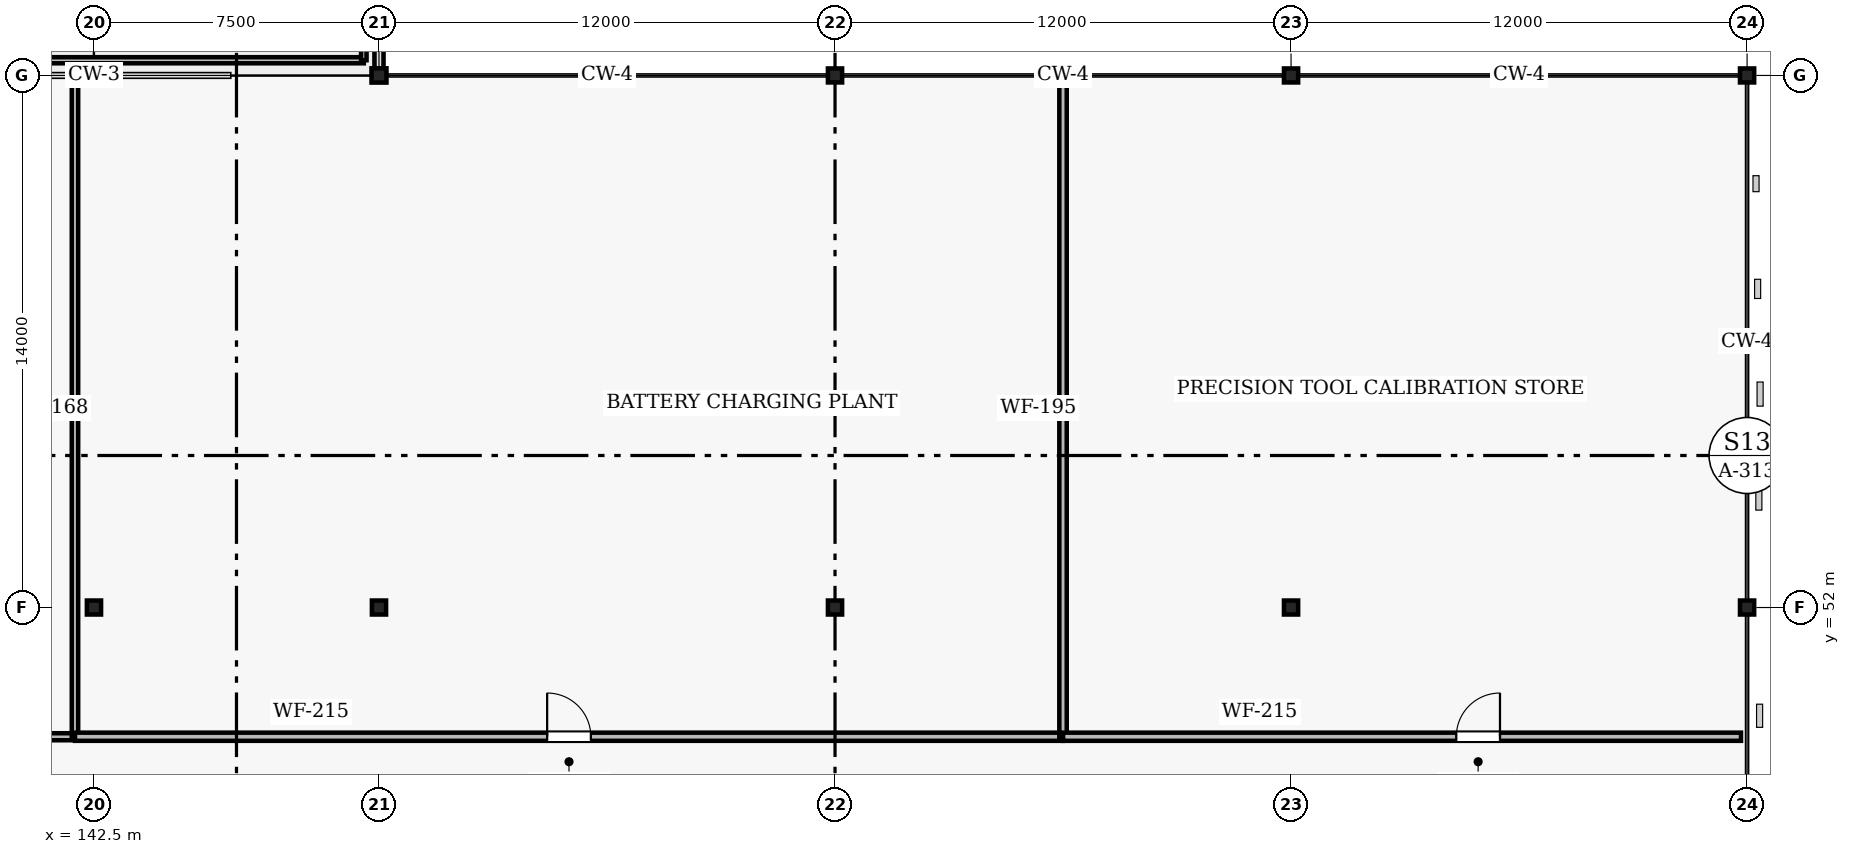
"""IFC4 building model, lengths in metres.
Left out: names, types, materials, properties, quantities, classifications, styles, units other than length and angle.
Written with IfcOpenShell. Run it as: python <this file> out.ifc"""

import sys

from ifc_helpers import new_model, si_unit, direction, frame, frame_2d, origin, origin_2d, place, context, subcontext, project, spatial, rectangle, i_section, extrude, element, fill, save


model = new_model("IFC4")
c1 = context("Model", 3, precision=1e-05, world=origin(), true_north=direction((0.0, 1.0)))
c2 = subcontext(c1, "Body", "Model", "MODEL_VIEW")
j1 = project(units=[si_unit("LENGTHUNIT", "METRE"), si_unit("PLANEANGLEUNIT", "RADIAN")], contexts=[c1])
p1 = place(None, origin())
s1 = spatial("IfcSite", under=j1, at=p1, CompositionType="ELEMENT")
p2 = place(p1, origin())
s2 = spatial("IfcBuilding", under=s1, at=p2, CompositionType="ELEMENT")
p3 = place(p2, frame((0.0, 0.0, 4.5)))
s3 = spatial("IfcBuildingStorey", under=s2, at=p3, CompositionType="ELEMENT", Elevation=4.5)
p4 = place(p3, frame((142.5, 52.0, 0.0), z_axis=(0.0, 0.0, 1.0), x_axis=(1.0, 0.0, 0.0)))
e1 = element("IfcColumn", 1, at=p4, inside=s3, PredefinedType="COLUMN", context=c2, shape_type="SweptSolid", body=[
    extrude(i_section(OverallWidth=0.373, OverallDepth=0.368, WebThickness=0.015, FlangeThickness=0.024, FilletRadius=0.015, at=origin_2d()), origin(), (0.0, 0.0, 1.0), 4.5),
])
p5 = place(p3, frame((142.5, 66.0, 0.0), z_axis=(0.0, 0.0, 1.0), x_axis=(1.0, 0.0, 0.0)))
e2 = element("IfcColumn", 2, at=p5, inside=s3, PredefinedType="COLUMN", context=c2, shape_type="SweptSolid", body=[
    extrude(i_section(OverallWidth=0.394, OverallDepth=0.375, WebThickness=0.021, FlangeThickness=0.033, FilletRadius=0.018, at=origin_2d()), origin(), (0.0, 0.0, 1.0), 4.5),
])
p6 = place(p3, frame((150.0, 52.0, 0.0), z_axis=(0.0, 0.0, 1.0), x_axis=(1.0, 0.0, 0.0)))
e3 = element("IfcColumn", 3, at=p6, inside=s3, PredefinedType="COLUMN", context=c2, shape_type="SweptSolid", body=[
    extrude(i_section(OverallWidth=0.373, OverallDepth=0.368, WebThickness=0.015, FlangeThickness=0.024, FilletRadius=0.015, at=origin_2d()), origin(), (0.0, 0.0, 1.0), 4.5),
])
p7 = place(p3, frame((150.0, 66.0, 0.0), z_axis=(0.0, 0.0, 1.0), x_axis=(1.0, 0.0, 0.0)))
e4 = element("IfcColumn", 4, at=p7, inside=s3, PredefinedType="COLUMN", context=c2, shape_type="SweptSolid", body=[
    extrude(i_section(OverallWidth=0.394, OverallDepth=0.375, WebThickness=0.021, FlangeThickness=0.033, FilletRadius=0.018, at=origin_2d()), origin(), (0.0, 0.0, 1.0), 4.5),
])
for number, where, z_axis, x_axis in (
    (5, (162.0, 52.0, 0.0), (0.0, 0.0, 1.0), (1.0, 0.0, 0.0)),
    (6, (162.0, 66.0, 0.0), (0.0, 0.0, 1.0), (1.0, 0.0, 0.0)),
    (7, (174.0, 52.0, 0.0), (0.0, 0.0, 1.0), (1.0, 0.0, 0.0)),
    (8, (174.0, 66.0, 0.0), (0.0, 0.0, 1.0), (1.0, 0.0, 0.0)),
    (9, (186.0, 52.0, 0.0), (0.0, 0.0, 1.0), (1.0, 0.0, 0.0)),
    (10, (186.0, 66.0, 0.0), (0.0, 0.0, 1.0), (1.0, 0.0, 0.0)),
):
    element("IfcColumn", number, at=place(p3, frame(where, z_axis=z_axis, x_axis=x_axis)), inside=s3, PredefinedType="COLUMN", context=c2, shape_type="SweptSolid", body=[
        extrude(i_section(OverallWidth=0.373, OverallDepth=0.368, WebThickness=0.015, FlangeThickness=0.024, FilletRadius=0.015, at=origin_2d()), origin(), (0.0, 0.0, 1.0), 4.5),
    ])
p8 = place(p3, frame((150.0, 66.08, 0.0), z_axis=(0.0, 0.0, 1.0), x_axis=(0.0, 1.0, 0.0)))
e11 = element("IfcWall", 11, at=p8, inside=s3, PredefinedType="SOLIDWALL", context=c2, shape_type="SweptSolid", body=[
    extrude(rectangle(XDim=12.0, YDim=0.24, at=frame_2d((6.0, 0.0))), origin(), (0.0, 0.0, 1.0), 3.5),
])
p9 = place(p3, frame((105.16, 66.4, 0.0), z_axis=(0.0, 0.0, 1.0), x_axis=(1.0, 0.0, 0.0)))
e12 = element("IfcWall", 12, at=p9, inside=s3, PredefinedType="PARTITIONING", context=c2, shape_type="SweptSolid", body=[
    extrude(rectangle(XDim=44.44, YDim=0.16, at=frame_2d((22.22, 0.0))), origin(), (0.0, 0.0, 1.0), 3.7),
])
p10 = place(p9, frame((10.695, 0.0, 0.0)))
e13 = element("IfcOpeningElement", 13, at=p10, cuts=e12, PredefinedType="OPENING", context=c2, shape_type="SweptSolid", body=[
    extrude(rectangle(XDim=1.66, YDim=2.2, at=frame_2d((0.83, 1.1))), frame((0.0, 0.09, 0.0), z_axis=(0.0, -1.0, 0.0), x_axis=(1.0, 0.0, 0.0)), (0.0, 0.0, 1.0), 0.18),
])
p11 = place(p3, frame((149.6, 66.4, 0.0), z_axis=(0.0, 0.0, 1.0), x_axis=(0.0, 1.0, 0.0)))
e14 = element("IfcWall", 14, at=p11, inside=s3, PredefinedType="PARTITIONING", context=c2, shape_type="SweptSolid", body=[
    extrude(rectangle(XDim=11.2, YDim=0.145, at=frame_2d((5.6, 0.0))), origin(), (0.0, 0.0, 1.0), 3.7),
])
p12 = place(p3, frame((105.16, 48.6, 0.0), z_axis=(0.0, 0.0, 1.0), x_axis=(1.0, 0.0, 0.0)))
e15 = element("IfcWall", 15, at=p12, inside=s3, PredefinedType="PARTITIONING", context=c2, shape_type="SweptSolid", body=[
    extrude(rectangle(XDim=36.84, YDim=0.185, at=frame_2d((18.42, 0.0))), origin(), (0.0, 0.0, 1.0), 3.7),
])
p13 = place(p12, frame((17.975, 0.0, 0.0)))
e16 = element("IfcOpeningElement", 16, at=p13, cuts=e15, PredefinedType="OPENING", context=c2, shape_type="SweptSolid", body=[
    extrude(rectangle(XDim=0.89, YDim=2.14, at=frame_2d((0.445, 1.07))), frame((0.0, 0.103, 0.0), z_axis=(0.0, -1.0, 0.0), x_axis=(1.0, 0.0, 0.0)), (0.0, 0.0, 1.0), 0.205),
])
p14 = place(p3, frame((142.0, 48.6, 0.0), z_axis=(0.0, 0.0, 1.0), x_axis=(0.0, 1.0, 0.0)))
e17 = element("IfcWall", 17, at=p14, inside=s3, PredefinedType="PARTITIONING", context=c2, shape_type="SweptSolid", body=[
    extrude(rectangle(XDim=17.32, YDim=0.168, at=frame_2d((8.66, 0.0))), origin(), (0.0, 0.0, 1.0), 3.7),
])
p15 = place(p3, frame((142.0, 48.6, 0.0), z_axis=(0.0, 0.0, 1.0), x_axis=(1.0, 0.0, 0.0)))
e18 = element("IfcWall", 18, at=p15, inside=s3, PredefinedType="PARTITIONING", context=c2, shape_type="SweptSolid", body=[
    extrude(rectangle(XDim=26.0, YDim=0.215, at=frame_2d((13.0, 0.0))), origin(), (0.0, 0.0, 1.0), 3.7),
])
p16 = place(p15, frame((12.425, 0.0, 0.0)))
e19 = element("IfcOpeningElement", 19, at=p16, cuts=e18, PredefinedType="OPENING", context=c2, shape_type="SweptSolid", body=[
    extrude(rectangle(XDim=1.15, YDim=2.15, at=frame_2d((0.575, 1.075))), frame((0.0, 0.117, 0.0), z_axis=(0.0, -1.0, 0.0), x_axis=(1.0, 0.0, 0.0)), (0.0, 0.0, 1.0), 0.235),
])
p17 = place(p3, frame((168.0, 48.6, 0.0), z_axis=(0.0, 0.0, 1.0), x_axis=(0.0, 1.0, 0.0)))
e20 = element("IfcWall", 20, at=p17, inside=s3, PredefinedType="PARTITIONING", context=c2, shape_type="SweptSolid", body=[
    extrude(rectangle(XDim=17.32, YDim=0.195, at=frame_2d((8.66, 0.0))), origin(), (0.0, 0.0, 1.0), 3.7),
])
p18 = place(p3, frame((168.0, 48.6, 0.0), z_axis=(0.0, 0.0, 1.0), x_axis=(1.0, 0.0, 0.0)))
e21 = element("IfcWall", 21, at=p18, inside=s3, PredefinedType="PARTITIONING", context=c2, shape_type="SweptSolid", body=[
    extrude(rectangle(XDim=17.84, YDim=0.215, at=frame_2d((8.92, 0.0))), origin(), (0.0, 0.0, 1.0), 3.7),
])
p19 = place(p18, frame((10.348, 0.0, 0.0)))
e22 = element("IfcOpeningElement", 22, at=p19, cuts=e21, PredefinedType="OPENING", context=c2, shape_type="SweptSolid", body=[
    extrude(rectangle(XDim=1.15, YDim=2.15, at=frame_2d((0.575, 1.075))), frame((0.0, 0.117, 0.0), z_axis=(0.0, -1.0, 0.0), x_axis=(1.0, 0.0, 0.0)), (0.0, 0.0, 1.0), 0.235),
])
p20 = place(p16, origin())
e23 = element("IfcDoor", 23, at=p20, inside=s3, OperationType="SINGLE_SWING_LEFT", PredefinedType="DOOR", context=c2, shape_type="SweptSolid", body=[
    extrude(rectangle(XDim=1.15, YDim=2.15, at=frame_2d((0.575, 1.075))), frame((0.0, 0.025, 0.0), z_axis=(0.0, -1.0, 0.0), x_axis=(1.0, 0.0, 0.0)), (0.0, 0.0, 1.0), 0.05),
])
fill(e19, e23)
p21 = place(p19, origin())
e24 = element("IfcDoor", 24, at=p21, inside=s3, OperationType="SINGLE_SWING_RIGHT", PredefinedType="DOOR", context=c2, shape_type="SweptSolid", body=[
    extrude(rectangle(XDim=1.15, YDim=2.15, at=frame_2d((0.575, 1.075))), frame((0.0, 0.025, 0.0), z_axis=(0.0, -1.0, 0.0), x_axis=(1.0, 0.0, 0.0)), (0.0, 0.0, 1.0), 0.05),
])
fill(e22, e24)
save(model, sys.argv[1])
